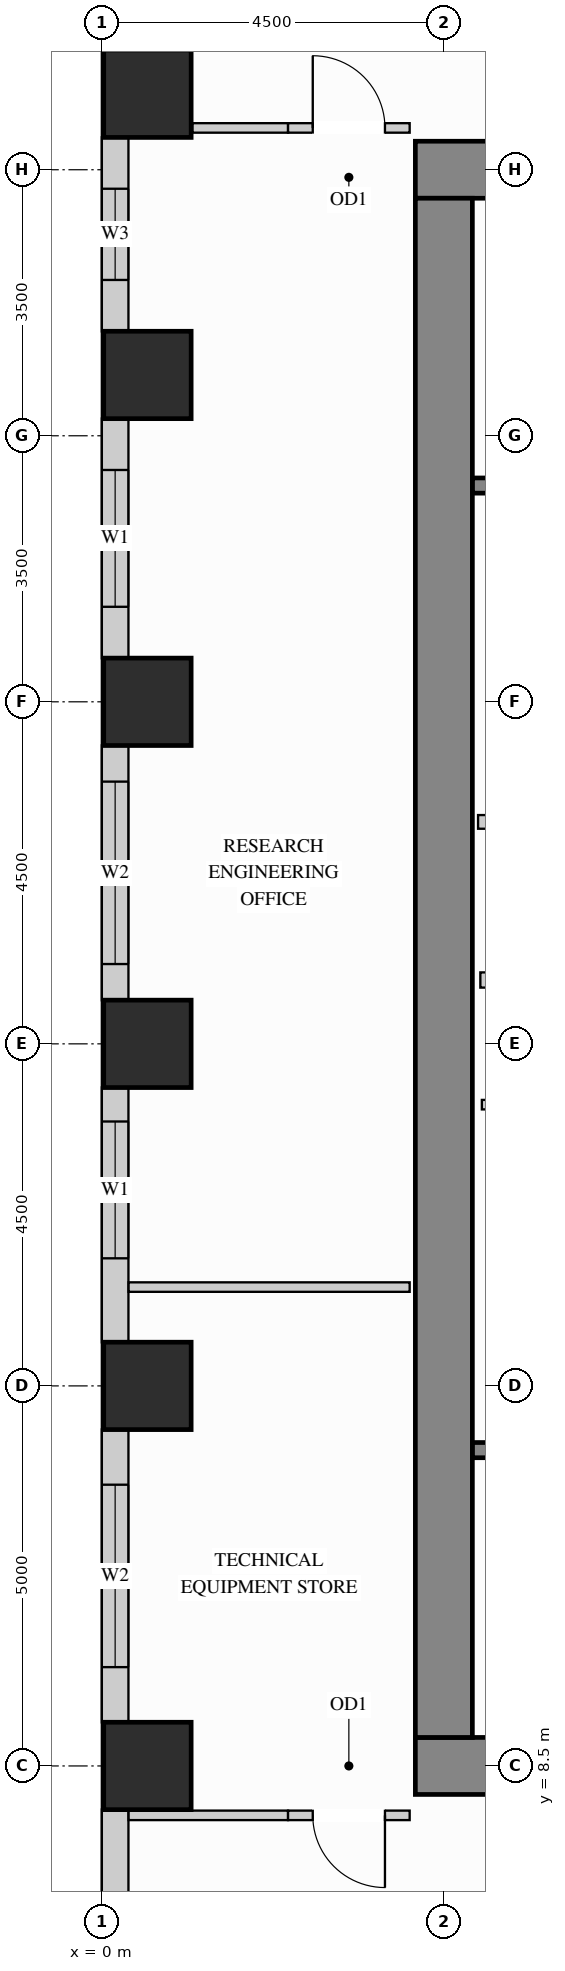
"""IFC4 building model, lengths in metres.
Left out: names, types, materials, properties, quantities, classifications, styles, units other than length and angle.
Written with IfcOpenShell. Run it as: python <this file> out.ifc"""

import sys

from ifc_helpers import new_model, si_unit, direction, frame, frame_2d, origin, origin_2d, place, context, subcontext, project, spatial, rectangle, extrude, source, transform, mapped, element, fill, save


model = new_model("IFC4")
c1 = context("Model", 3, precision=1e-05, world=origin(), true_north=direction((0.0, 1.0)))
c2 = subcontext(c1, "Body", "Model", "MODEL_VIEW")
j1 = project(units=[si_unit("LENGTHUNIT", "METRE"), si_unit("PLANEANGLEUNIT", "RADIAN")], contexts=[c1])
p1 = place(None, origin())
s1 = spatial("IfcSite", under=j1, at=p1, CompositionType="ELEMENT")
p2 = place(p1, origin())
s2 = spatial("IfcBuilding", under=s1, at=p2, CompositionType="ELEMENT")
p3 = place(p2, frame((0.0, 0.0, 95.4)))
s3 = spatial("IfcBuildingStorey", under=s2, at=p3, CompositionType="ELEMENT", Elevation=95.4)
m1 = source(origin(), c2, "Body", "SweptSolid", [
    extrude(rectangle(XDim=1.15, YDim=1.15, at=origin_2d()), origin(), (0.0, 0.0, 1.0), 3.38),
])
for number, where, z_axis, x_axis in (
    (1, (0.6, 13.5, 0.0), (0.0, 0.0, 1.0), (1.0, 0.0, 0.0)),
    (2, (0.6, 18.0, 0.0), (0.0, 0.0, 1.0), (1.0, 0.0, 0.0)),
    (3, (0.6, 22.5, 0.0), (0.0, 0.0, 1.0), (1.0, 0.0, 0.0)),
    (4, (0.6, 26.8, 0.0), (0.0, 0.0, 1.0), (1.0, 0.0, 0.0)),
    (5, (0.6, 30.5, 0.0), (0.0, 0.0, 1.0), (1.0, 0.0, 0.0)),
    (6, (0.6, 8.5, 0.0), (0.0, 0.0, 1.0), (1.0, 0.0, 0.0)),
):
    element("IfcColumn", number, at=place(p3, frame(where, z_axis=z_axis, x_axis=x_axis)), inside=s3, PredefinedType="COLUMN", context=c2, shape_type="MappedRepresentation", body=[
        mapped(m1, transform((0.0, 0.0, 0.0), x_axis=(1.0, 0.0, 0.0), y_axis=(0.0, 1.0, 0.0), z_axis=(0.0, 0.0, 1.0))),
    ])
m2 = source(origin(), c2, "Body", "SweptSolid", [
    extrude(rectangle(XDim=10.75, YDim=0.75, at=frame_2d((5.375, 0.0))), origin(), (0.0, 0.0, 1.0), 3.38),
])
for number, where, z_axis, x_axis in (
    (7, (4.125, 29.5, 0.0), (0.0, 0.0, 1.0), (1.0, 0.0, 0.0)),
    (8, (4.125, 8.5, 0.0), (0.0, 0.0, 1.0), (1.0, 0.0, 0.0)),
):
    element("IfcWall", number, at=place(p3, frame(where, z_axis=z_axis, x_axis=x_axis)), inside=s3, PredefinedType="SHEAR", context=c2, shape_type="MappedRepresentation", body=[
        mapped(m2, transform((0.0, 0.0, 0.0), x_axis=(1.0, 0.0, 0.0), y_axis=(0.0, 1.0, 0.0), z_axis=(0.0, 0.0, 1.0))),
    ])
m3 = source(origin(), c2, "Body", "SweptSolid", [
    extrude(rectangle(XDim=20.25, YDim=0.75, at=frame_2d((10.125, 0.0))), origin(), (0.0, 0.0, 1.0), 3.38),
])
p4 = place(p3, frame((4.5, 8.875, 0.0), z_axis=(0.0, 0.0, 1.0), x_axis=(0.0, 1.0, 0.0)))
e9 = element("IfcWall", 9, at=p4, inside=s3, PredefinedType="SHEAR", context=c2, shape_type="MappedRepresentation", body=[
    mapped(m3, transform((0.0, 0.0, 0.0), x_axis=(1.0, 0.0, 0.0), y_axis=(0.0, 1.0, 0.0), z_axis=(0.0, 0.0, 1.0))),
])
p5 = place(p3, frame((0.175, 29.927, 0.0), z_axis=(0.0, 0.0, 1.0), x_axis=(0.0, -1.0, 0.0)))
e10 = element("IfcWall", 10, at=p5, inside=s3, PredefinedType="SOLIDWALL", context=c2, shape_type="SweptSolid", body=[
    extrude(rectangle(XDim=2.554, YDim=0.35, at=frame_2d((1.277, 0.0))), origin(), (0.0, 0.0, 1.0), 3.365),
])
p6 = place(p5, frame((0.677, 0.0, 0.78)))
e11 = element("IfcOpeningElement", 11, at=p6, cuts=e10, PredefinedType="OPENING", context=c2, shape_type="SweptSolid", body=[
    extrude(rectangle(XDim=1.2, YDim=2.1, at=frame_2d((0.6, 1.05))), frame((0.0, 0.185, 0.0), z_axis=(0.0, -1.0, 0.0), x_axis=(1.0, 0.0, 0.0)), (0.0, 0.0, 1.0), 0.37),
])
p7 = place(p3, frame((0.175, 26.227, 0.0), z_axis=(0.0, 0.0, 1.0), x_axis=(0.0, -1.0, 0.0)))
e12 = element("IfcWall", 12, at=p7, inside=s3, PredefinedType="SOLIDWALL", context=c2, shape_type="SweptSolid", body=[
    extrude(rectangle(XDim=3.154, YDim=0.35, at=frame_2d((1.577, 0.0))), origin(), (0.0, 0.0, 1.0), 3.365),
])
p8 = place(p7, frame((0.677, 0.0, 0.78)))
e13 = element("IfcOpeningElement", 13, at=p8, cuts=e12, PredefinedType="OPENING", context=c2, shape_type="SweptSolid", body=[
    extrude(rectangle(XDim=1.8, YDim=2.1, at=frame_2d((0.9, 1.05))), frame((0.0, 0.185, 0.0), z_axis=(0.0, -1.0, 0.0), x_axis=(1.0, 0.0, 0.0)), (0.0, 0.0, 1.0), 0.37),
])
p9 = place(p3, frame((0.175, 21.927, 0.0), z_axis=(0.0, 0.0, 1.0), x_axis=(0.0, -1.0, 0.0)))
e14 = element("IfcWall", 14, at=p9, inside=s3, PredefinedType="SOLIDWALL", context=c2, shape_type="SweptSolid", body=[
    extrude(rectangle(XDim=3.354, YDim=0.35, at=frame_2d((1.677, 0.0))), origin(), (0.0, 0.0, 1.0), 3.365),
])
p10 = place(p9, frame((0.477, 0.0, 0.78)))
e15 = element("IfcOpeningElement", 15, at=p10, cuts=e14, PredefinedType="OPENING", context=c2, shape_type="SweptSolid", body=[
    extrude(rectangle(XDim=2.4, YDim=2.1, at=frame_2d((1.2, 1.05))), frame((0.0, 0.185, 0.0), z_axis=(0.0, -1.0, 0.0), x_axis=(1.0, 0.0, 0.0)), (0.0, 0.0, 1.0), 0.37),
])
p11 = place(p3, frame((0.175, 17.427, 0.0), z_axis=(0.0, 0.0, 1.0), x_axis=(0.0, -1.0, 0.0)))
e16 = element("IfcWall", 16, at=p11, inside=s3, PredefinedType="SOLIDWALL", context=c2, shape_type="SweptSolid", body=[
    extrude(rectangle(XDim=3.354, YDim=0.35, at=frame_2d((1.677, 0.0))), origin(), (0.0, 0.0, 1.0), 3.365),
])
p12 = place(p11, frame((0.448, 0.0, 0.78)))
e17 = element("IfcOpeningElement", 17, at=p12, cuts=e16, PredefinedType="OPENING", context=c2, shape_type="SweptSolid", body=[
    extrude(rectangle(XDim=1.8, YDim=2.1, at=frame_2d((0.9, 1.05))), frame((0.0, 0.185, 0.0), z_axis=(0.0, -1.0, 0.0), x_axis=(1.0, 0.0, 0.0)), (0.0, 0.0, 1.0), 0.37),
])
p13 = place(p3, frame((0.175, 12.927, 0.0), z_axis=(0.0, 0.0, 1.0), x_axis=(0.0, -1.0, 0.0)))
e18 = element("IfcWall", 18, at=p13, inside=s3, PredefinedType="SOLIDWALL", context=c2, shape_type="SweptSolid", body=[
    extrude(rectangle(XDim=3.854, YDim=0.35, at=frame_2d((1.927, 0.0))), origin(), (0.0, 0.0, 1.0), 3.365),
])
p14 = place(p13, frame((0.727, 0.0, 0.78)))
e19 = element("IfcOpeningElement", 19, at=p14, cuts=e18, PredefinedType="OPENING", context=c2, shape_type="SweptSolid", body=[
    extrude(rectangle(XDim=2.4, YDim=2.1, at=frame_2d((1.2, 1.05))), frame((0.0, 0.185, 0.0), z_axis=(0.0, -1.0, 0.0), x_axis=(1.0, 0.0, 0.0)), (0.0, 0.0, 1.0), 0.37),
])
p15 = place(p3, frame((0.175, 7.927, 0.0), z_axis=(0.0, 0.0, 1.0), x_axis=(0.0, -1.0, 0.0)))
e20 = element("IfcWall", 20, at=p15, inside=s3, PredefinedType="SOLIDWALL", context=c2, shape_type="SweptSolid", body=[
    extrude(rectangle(XDim=3.854, YDim=0.35, at=frame_2d((1.927, 0.0))), origin(), (0.0, 0.0, 1.0), 3.365),
])
p16 = place(p15, frame((2.18, 0.0, 0.78)))
e21 = element("IfcOpeningElement", 21, at=p16, cuts=e20, PredefinedType="OPENING", context=c2, shape_type="SweptSolid", body=[
    extrude(rectangle(XDim=1.2, YDim=2.1, at=frame_2d((0.6, 1.05))), frame((0.0, 0.185, 0.0), z_axis=(0.0, -1.0, 0.0), x_axis=(1.0, 0.0, 0.0)), (0.0, 0.0, 1.0), 0.37),
])
m4 = source(origin(), c2, "Body", "SweptSolid", [
    extrude(rectangle(XDim=2.2, YDim=0.18, at=frame_2d((1.1, 0.0))), origin(), (0.0, 0.0, 1.0), 3.365),
])
p17 = place(p3, frame((4.95, 20.92, 0.0), z_axis=(0.0, 0.0, 1.0), x_axis=(1.0, 0.0, 0.0)))
e22 = element("IfcWall", 22, at=p17, inside=s3, PredefinedType="PARTITIONING", context=c2, shape_type="MappedRepresentation", body=[
    mapped(m4, transform((0.0, 0.0, 0.0), x_axis=(1.0, 0.0, 0.0), y_axis=(0.0, 1.0, 0.0), z_axis=(0.0, 0.0, 1.0))),
])
p18 = place(p3, frame((5.0, 17.2, 0.0), z_axis=(0.0, 0.0, 1.0), x_axis=(1.0, 0.0, 0.0)))
e23 = element("IfcWall", 23, at=p18, inside=s3, PredefinedType="PARTITIONING", context=c2, shape_type="SweptSolid", body=[
    extrude(rectangle(XDim=2.4, YDim=0.125, at=frame_2d((1.2, 0.0))), origin(), (0.0, 0.0, 1.0), 3.365),
])
p19 = place(p18, frame((0.7, 0.0, 0.0)))
e24 = element("IfcOpeningElement", 24, at=p19, cuts=e23, PredefinedType="OPENING", context=c2, shape_type="SweptSolid", body=[
    extrude(rectangle(XDim=0.85, YDim=2.1, at=frame_2d((0.425, 1.05))), frame((0.0, 0.073, 0.0), z_axis=(0.0, -1.0, 0.0), x_axis=(1.0, 0.0, 0.0)), (0.0, 0.0, 1.0), 0.145),
])
m5 = source(origin(), c2, "Body", "SweptSolid", [
    extrude(rectangle(XDim=1.26, YDim=0.125, at=frame_2d((0.63, 0.0))), origin(), (0.0, 0.0, 1.0), 3.365),
])
p20 = place(p3, frame((1.19, 30.05, 0.0), z_axis=(0.0, 0.0, 1.0), x_axis=(1.0, 0.0, 0.0)))
e25 = element("IfcWall", 25, at=p20, inside=s3, PredefinedType="PARTITIONING", context=c2, shape_type="MappedRepresentation", body=[
    mapped(m5, transform((0.0, 0.0, 0.0), x_axis=(1.0, 0.0, 0.0), y_axis=(0.0, 1.0, 0.0), z_axis=(0.0, 0.0, 1.0))),
])
p21 = place(p3, frame((2.45, 30.05, 0.0), z_axis=(0.0, 0.0, 1.0), x_axis=(1.0, 0.0, 0.0)))
e26 = element("IfcWall", 26, at=p21, inside=s3, PredefinedType="PARTITIONING", context=c2, shape_type="SweptSolid", body=[
    extrude(rectangle(XDim=1.6, YDim=0.125, at=frame_2d((0.8, 0.0))), origin(), (0.0, 0.0, 1.0), 3.365),
])
p22 = place(p21, frame((0.325, 0.0, 0.0)))
e27 = element("IfcOpeningElement", 27, at=p22, cuts=e26, PredefinedType="OPENING", context=c2, shape_type="SweptSolid", body=[
    extrude(rectangle(XDim=0.95, YDim=2.15, at=frame_2d((0.475, 1.075))), frame((0.0, 0.073, 0.0), z_axis=(0.0, -1.0, 0.0), x_axis=(1.0, 0.0, 0.0)), (0.0, 0.0, 1.0), 0.145),
])
m6 = source(origin(), c2, "Body", "SweptSolid", [
    extrude(rectangle(XDim=2.098, YDim=0.125, at=frame_2d((1.049, 0.0))), origin(), (0.0, 0.0, 1.0), 3.365),
])
p23 = place(p3, frame((0.352, 7.85, 0.0), z_axis=(0.0, 0.0, 1.0), x_axis=(1.0, 0.0, 0.0)))
e28 = element("IfcWall", 28, at=p23, inside=s3, PredefinedType="PARTITIONING", context=c2, shape_type="MappedRepresentation", body=[
    mapped(m6, transform((0.0, 0.0, 0.0), x_axis=(1.0, 0.0, 0.0), y_axis=(0.0, 1.0, 0.0), z_axis=(0.0, 0.0, 1.0))),
])
p24 = place(p3, frame((2.45, 7.85, 0.0), z_axis=(0.0, 0.0, 1.0), x_axis=(1.0, 0.0, 0.0)))
e29 = element("IfcWall", 29, at=p24, inside=s3, PredefinedType="PARTITIONING", context=c2, shape_type="SweptSolid", body=[
    extrude(rectangle(XDim=1.6, YDim=0.125, at=frame_2d((0.8, 0.0))), origin(), (0.0, 0.0, 1.0), 3.365),
])
p25 = place(p24, frame((0.325, 0.0, 0.0)))
e30 = element("IfcOpeningElement", 30, at=p25, cuts=e29, PredefinedType="OPENING", context=c2, shape_type="SweptSolid", body=[
    extrude(rectangle(XDim=0.95, YDim=2.15, at=frame_2d((0.475, 1.075))), frame((0.0, 0.073, 0.0), z_axis=(0.0, -1.0, 0.0), x_axis=(1.0, 0.0, 0.0)), (0.0, 0.0, 1.0), 0.145),
])
m7 = source(origin(), c2, "Body", "SweptSolid", [
    extrude(rectangle(XDim=3.698, YDim=0.125, at=frame_2d((1.849, 0.0))), origin(), (0.0, 0.0, 1.0), 3.365),
])
p26 = place(p3, frame((0.352, 14.8, 0.0), z_axis=(0.0, 0.0, 1.0), x_axis=(1.0, 0.0, 0.0)))
e31 = element("IfcWall", 31, at=p26, inside=s3, PredefinedType="PARTITIONING", context=c2, shape_type="MappedRepresentation", body=[
    mapped(m7, transform((0.0, 0.0, 0.0), x_axis=(1.0, 0.0, 0.0), y_axis=(0.0, 1.0, 0.0), z_axis=(0.0, 0.0, 1.0))),
])
m8 = source(origin(), c2, "Body", "SweptSolid", [
    extrude(rectangle(XDim=2.09, YDim=0.2, at=frame_2d((1.045, 0.0))), origin(), (0.0, 0.0, 1.0), 3.365),
])
p27 = place(p3, frame((4.98, 18.84, 0.0), z_axis=(0.0, 0.0, 1.0), x_axis=(1.0, 0.0, 0.0)))
e32 = element("IfcWall", 32, at=p27, inside=s3, PredefinedType="PARTITIONING", context=c2, shape_type="MappedRepresentation", body=[
    mapped(m8, transform((0.0, 0.0, 0.0), x_axis=(1.0, 0.0, 0.0), y_axis=(0.0, 1.0, 0.0), z_axis=(0.0, 0.0, 1.0))),
])
p28 = place(p3, frame((4.877, 12.655, 0.0), z_axis=(0.0, 0.0, 1.0), x_axis=(1.0, 0.0, 0.0)))
e33 = element("IfcWall", 33, at=p28, inside=s3, PredefinedType="SHEAR", context=c2, shape_type="SweptSolid", body=[
    extrude(rectangle(XDim=7.528, YDim=0.2, at=frame_2d((3.764, 0.0))), origin(), (0.0, 0.0, 1.0), 3.38),
])
p29 = place(p28, frame((0.4, 0.0, 0.0)))
e34 = element("IfcOpeningElement", 34, at=p29, cuts=e33, PredefinedType="OPENING", context=c2, shape_type="SweptSolid", body=[
    extrude(rectangle(XDim=1.1, YDim=2.15, at=frame_2d((0.55, 1.075))), frame((0.0, 0.11, 0.0), z_axis=(0.0, -1.0, 0.0), x_axis=(1.0, 0.0, 0.0)), (0.0, 0.0, 1.0), 0.22),
])
p30 = place(p3, frame((4.877, 25.345, 0.0), z_axis=(0.0, 0.0, 1.0), x_axis=(1.0, 0.0, 0.0)))
e35 = element("IfcWall", 35, at=p30, inside=s3, PredefinedType="SHEAR", context=c2, shape_type="SweptSolid", body=[
    extrude(rectangle(XDim=7.528, YDim=0.2, at=frame_2d((3.764, 0.0))), origin(), (0.0, 0.0, 1.0), 3.38),
])
p31 = place(p30, frame((0.4, 0.0, 0.0)))
e36 = element("IfcOpeningElement", 36, at=p31, cuts=e35, PredefinedType="OPENING", context=c2, shape_type="SweptSolid", body=[
    extrude(rectangle(XDim=1.1, YDim=2.15, at=frame_2d((0.55, 1.075))), frame((0.0, 0.11, 0.0), z_axis=(0.0, -1.0, 0.0), x_axis=(1.0, 0.0, 0.0)), (0.0, 0.0, 1.0), 0.22),
])
m9 = source(origin(), c2, "Body", "SweptSolid", [
    extrude(rectangle(XDim=0.95, YDim=2.15, at=frame_2d((0.475, 1.075))), frame((0.0, 0.025, 0.0), z_axis=(0.0, -1.0, 0.0), x_axis=(1.0, 0.0, 0.0)), (0.0, 0.0, 1.0), 0.05),
])
p32 = place(p25, origin())
e37 = element("IfcDoor", 37, at=p32, inside=s3, OperationType="SINGLE_SWING_RIGHT", PredefinedType="DOOR", context=c2, shape_type="MappedRepresentation", body=[
    mapped(m9, transform((0.0, 0.0, 0.0), x_axis=(1.0, 0.0, 0.0), y_axis=(0.0, 1.0, 0.0), z_axis=(0.0, 0.0, 1.0))),
])
fill(e30, e37)
p33 = place(p22, origin())
e38 = element("IfcDoor", 38, at=p33, inside=s3, OperationType="SINGLE_SWING_LEFT", PredefinedType="DOOR", context=c2, shape_type="MappedRepresentation", body=[
    mapped(m9, transform((0.0, 0.0, 0.0), x_axis=(1.0, 0.0, 0.0), y_axis=(0.0, 1.0, 0.0), z_axis=(0.0, 0.0, 1.0))),
])
fill(e27, e38)
m10 = source(origin(), c2, "Body", "SweptSolid", [
    extrude(rectangle(XDim=1.8, YDim=2.1, at=frame_2d((0.9, 1.05))), frame((0.0, 0.03, 0.0), z_axis=(0.0, -1.0, 0.0), x_axis=(1.0, 0.0, 0.0)), (0.0, 0.0, 1.0), 0.06),
])
p34 = place(p8, origin())
e39 = element("IfcWindow", 39, at=p34, inside=s3, PartitioningType="SINGLE_PANEL", PredefinedType="WINDOW", context=c2, shape_type="MappedRepresentation", body=[
    mapped(m10, transform((0.0, 0.0, 0.0), x_axis=(1.0, 0.0, 0.0), y_axis=(0.0, 1.0, 0.0), z_axis=(0.0, 0.0, 1.0))),
])
fill(e13, e39)
p35 = place(p12, origin())
e40 = element("IfcWindow", 40, at=p35, inside=s3, PartitioningType="SINGLE_PANEL", PredefinedType="WINDOW", context=c2, shape_type="MappedRepresentation", body=[
    mapped(m10, transform((0.0, 0.0, 0.0), x_axis=(1.0, 0.0, 0.0), y_axis=(0.0, 1.0, 0.0), z_axis=(0.0, 0.0, 1.0))),
])
fill(e17, e40)
m11 = source(origin(), c2, "Body", "SweptSolid", [
    extrude(rectangle(XDim=2.4, YDim=2.1, at=frame_2d((1.2, 1.05))), frame((0.0, 0.03, 0.0), z_axis=(0.0, -1.0, 0.0), x_axis=(1.0, 0.0, 0.0)), (0.0, 0.0, 1.0), 0.06),
])
p36 = place(p10, origin())
e41 = element("IfcWindow", 41, at=p36, inside=s3, PartitioningType="SINGLE_PANEL", PredefinedType="WINDOW", context=c2, shape_type="MappedRepresentation", body=[
    mapped(m11, transform((0.0, 0.0, 0.0), x_axis=(1.0, 0.0, 0.0), y_axis=(0.0, 1.0, 0.0), z_axis=(0.0, 0.0, 1.0))),
])
fill(e15, e41)
p37 = place(p14, origin())
e42 = element("IfcWindow", 42, at=p37, inside=s3, PartitioningType="SINGLE_PANEL", PredefinedType="WINDOW", context=c2, shape_type="MappedRepresentation", body=[
    mapped(m11, transform((0.0, 0.0, 0.0), x_axis=(1.0, 0.0, 0.0), y_axis=(0.0, 1.0, 0.0), z_axis=(0.0, 0.0, 1.0))),
])
fill(e19, e42)
m12 = source(origin(), c2, "Body", "SweptSolid", [
    extrude(rectangle(XDim=1.2, YDim=2.1, at=frame_2d((0.6, 1.05))), frame((0.0, 0.03, 0.0), z_axis=(0.0, -1.0, 0.0), x_axis=(1.0, 0.0, 0.0)), (0.0, 0.0, 1.0), 0.06),
])
p38 = place(p6, origin())
e43 = element("IfcWindow", 43, at=p38, inside=s3, PartitioningType="SINGLE_PANEL", PredefinedType="WINDOW", context=c2, shape_type="MappedRepresentation", body=[
    mapped(m12, transform((0.0, 0.0, 0.0), x_axis=(1.0, 0.0, 0.0), y_axis=(0.0, 1.0, 0.0), z_axis=(0.0, 0.0, 1.0))),
])
fill(e11, e43)
save(model, sys.argv[1])
